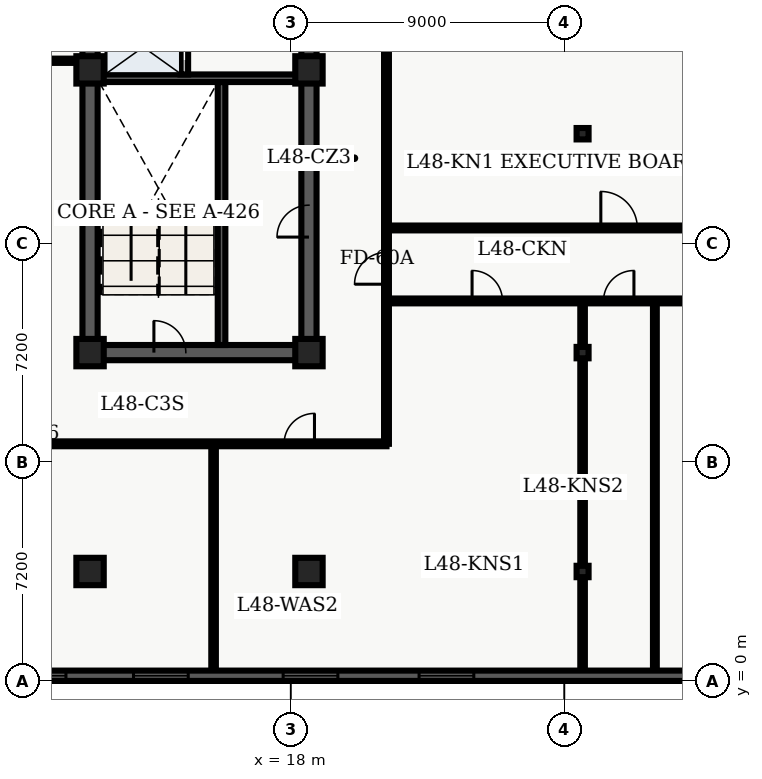
"""IFC4 building model, lengths in metres.
Left out: names, types, materials, properties, quantities, classifications, styles, units other than length and angle.
Written with IfcOpenShell. Run it as: python <this file> out.ifc"""

import sys

from ifc_helpers import new_model, entity, si_unit, converted_unit, direction, frame, origin_with_axes, origin_2d_with_axis, place, context, subcontext, project, spatial, polyline, rectangle, i_section, outline, extrude, element, fill, save


model = new_model("IFC4")
c1 = context("Model", 3, precision=1e-05, world=origin_with_axes(), true_north=direction((0.0, 1.0)))
c2 = subcontext(c1, "Body", "Model", "MODEL_VIEW")
j1 = project(units=[si_unit("LENGTHUNIT", "METRE"), converted_unit("PLANEANGLEUNIT", "DEGREE", entity("IfcPlaneAngleMeasure", 0.017), si_unit("PLANEANGLEUNIT", "RADIAN"), dimensions=[0, 0, 0, 0, 0, 0, 0])], contexts=[c1])
p1 = place(None, origin_with_axes())
s1 = spatial("IfcSite", under=j1, at=p1, CompositionType="ELEMENT")
p2 = place(p1, origin_with_axes())
s2 = spatial("IfcBuilding", under=s1, at=p2, CompositionType="ELEMENT")
p3 = place(p2, frame((0.0, 0.0, 196.5), z_axis=(0.0, 0.0, 1.0), x_axis=(1.0, 0.0, 0.0)))
s3 = spatial("IfcBuildingStorey", under=s2, at=p3, CompositionType="ELEMENT", Elevation=196.5)
p4 = place(p3, frame((11.4, 10.8, 0.0), z_axis=(0.0, 0.0, 1.0), x_axis=(0.0, 1.0, 0.0)))
e1 = element("IfcWall", 1, at=p4, inside=s3, PredefinedType="SHEAR", context=c2, shape_type="SweptSolid", body=[
    extrude(outline(polyline([(0.0, -0.25), (27.0, -0.25), (27.0, 0.25), (0.0, 0.25), (0.0, -0.25)])), origin_with_axes(), (0.0, 0.0, 1.0), 3.66),
])
p5 = place(p3, frame((11.4, 10.8, 0.0), z_axis=(0.0, 0.0, 1.0), x_axis=(1.0, 0.0, 0.0)))
e2 = element("IfcWall", 2, at=p5, inside=s3, PredefinedType="SHEAR", context=c2, shape_type="SweptSolid", body=[
    extrude(outline(polyline([(0.0, -0.25), (7.2, -0.25), (7.2, 0.25), (0.0, 0.25), (0.0, -0.25)])), origin_with_axes(), (0.0, 0.0, 1.0), 3.66),
])
p6 = place(p5, frame((2.625, 0.0, 0.0), z_axis=(0.0, 0.0, 1.0), x_axis=(1.0, 0.0, 0.0)))
e3 = element("IfcOpeningElement", 3, at=p6, cuts=e2, PredefinedType="OPENING", context=c2, shape_type="SweptSolid", body=[
    extrude(rectangle(XDim=1.05, YDim=0.52, at=origin_2d_with_axis()), origin_with_axes(), (0.0, 0.0, 1.0), 2.15),
])
p7 = place(p3, frame((18.6, 10.8, 0.0), z_axis=(0.0, 0.0, 1.0), x_axis=(0.0, 1.0, 0.0)))
e4 = element("IfcWall", 4, at=p7, inside=s3, PredefinedType="SHEAR", context=c2, shape_type="SweptSolid", body=[
    extrude(outline(polyline([(0.0, -0.25), (13.5, -0.25), (13.5, 0.25), (0.0, 0.25), (0.0, -0.25)])), origin_with_axes(), (0.0, 0.0, 1.0), 3.66),
])
p8 = place(p7, frame((11.125, 0.0, 0.0), z_axis=(0.0, 0.0, 1.0), x_axis=(1.0, 0.0, 0.0)))
e5 = element("IfcOpeningElement", 5, at=p8, cuts=e4, PredefinedType="OPENING", context=c2, shape_type="SweptSolid", body=[
    extrude(rectangle(XDim=1.05, YDim=0.52, at=origin_2d_with_axis()), origin_with_axes(), (0.0, 0.0, 1.0), 2.15),
])
p9 = place(p7, frame((4.325, 0.0, 0.0), z_axis=(0.0, 0.0, 1.0), x_axis=(1.0, 0.0, 0.0)))
e6 = element("IfcOpeningElement", 6, at=p9, cuts=e4, PredefinedType="OPENING", context=c2, shape_type="SweptSolid", body=[
    extrude(rectangle(XDim=1.05, YDim=0.52, at=origin_2d_with_axis()), origin_with_axes(), (0.0, 0.0, 1.0), 2.15),
])
p10 = place(p3, frame((15.725, 11.05, 0.0), z_axis=(0.0, 0.0, 1.0), x_axis=(0.0, 1.0, 0.0)))
e7 = element("IfcWall", 7, at=p10, inside=s3, PredefinedType="SHEAR", context=c2, shape_type="SweptSolid", body=[
    extrude(outline(polyline([(0.0, -0.125), (8.65, -0.125), (8.65, 0.125), (0.0, 0.125), (0.0, -0.125)])), origin_with_axes(), (0.0, 0.0, 1.0), 3.66),
])
p11 = place(p3, frame((11.65, 19.825, 0.0), z_axis=(0.0, 0.0, 1.0), x_axis=(1.0, 0.0, 0.0)))
e8 = element("IfcWall", 8, at=p11, inside=s3, PredefinedType="SHEAR", context=c2, shape_type="SweptSolid", body=[
    extrude(outline(polyline([(0.0, -0.125), (6.7, -0.125), (6.7, 0.125), (0.0, 0.125), (0.0, -0.125)])), origin_with_axes(), (0.0, 0.0, 1.0), 3.66),
])
p12 = place(p3, frame((14.5, 19.95, 0.0), z_axis=(0.0, 0.0, 1.0), x_axis=(0.0, 1.0, 0.0)))
e9 = element("IfcWall", 9, at=p12, inside=s3, PredefinedType="SOLIDWALL", context=c2, shape_type="SweptSolid", body=[
    extrude(outline(polyline([(0.0, -0.125), (6.25, -0.125), (6.25, 0.125), (0.0, 0.125), (0.0, -0.125)])), origin_with_axes(), (0.0, 0.0, 1.0), 2.7),
])
p13 = place(p12, frame((1.025, 0.0, 0.0), z_axis=(0.0, 0.0, 1.0), x_axis=(1.0, 0.0, 0.0)))
e10 = element("IfcOpeningElement", 10, at=p13, cuts=e9, PredefinedType="OPENING", context=c2, shape_type="SweptSolid", body=[
    extrude(rectangle(XDim=1.1, YDim=0.27, at=origin_2d_with_axis()), origin_with_axes(), (0.0, 0.0, 1.0), 2.15),
])
p14 = place(p12, frame((2.975, 0.0, 0.0), z_axis=(0.0, 0.0, 1.0), x_axis=(1.0, 0.0, 0.0)))
e11 = element("IfcOpeningElement", 11, at=p14, cuts=e9, PredefinedType="OPENING", context=c2, shape_type="SweptSolid", body=[
    extrude(rectangle(XDim=1.1, YDim=0.27, at=origin_2d_with_axis()), origin_with_axes(), (0.0, 0.0, 1.0), 2.15),
])
p15 = place(p12, frame((5.425, 0.0, 0.0), z_axis=(0.0, 0.0, 1.0), x_axis=(1.0, 0.0, 0.0)))
e12 = element("IfcOpeningElement", 12, at=p15, cuts=e9, PredefinedType="OPENING", context=c2, shape_type="SweptSolid", body=[
    extrude(rectangle(XDim=1.2, YDim=0.27, at=origin_2d_with_axis()), origin_with_axes(), (0.0, 0.0, 1.0), 2.15),
])
for number, where, z_axis, x_axis in (
    (13, (11.4, 3.6, 0.0), (0.0, 0.0, 1.0), (1.0, 0.0, 0.0)),
    (14, (11.4, 10.8, 0.0), (0.0, 0.0, 1.0), (1.0, 0.0, 0.0)),
    (15, (11.4, 20.1, 0.0), (0.0, 0.0, 1.0), (1.0, 0.0, 0.0)),
    (16, (18.6, 3.6, 0.0), (0.0, 0.0, 1.0), (1.0, 0.0, 0.0)),
    (17, (18.6, 10.8, 0.0), (0.0, 0.0, 1.0), (1.0, 0.0, 0.0)),
    (18, (18.6, 20.1, 0.0), (0.0, 0.0, 1.0), (1.0, 0.0, 0.0)),
):
    element("IfcColumn", number, at=place(p3, frame(where, z_axis=z_axis, x_axis=x_axis)), inside=s3, PredefinedType="COLUMN", context=c2, shape_type="SweptSolid", body=[
        extrude(rectangle(XDim=0.9, YDim=0.9, at=origin_2d_with_axis()), origin_with_axes(), (0.0, 0.0, 1.0), 3.9),
    ])
for number, where, z_axis, x_axis in (
    (19, (27.6, 3.6, 0.0), (0.0, 0.0, 1.0), (1.0, 0.0, 0.0)),
    (20, (27.6, 10.8, 0.0), (0.0, 0.0, 1.0), (1.0, 0.0, 0.0)),
    (21, (27.6, 18.0, 0.0), (0.0, 0.0, 1.0), (1.0, 0.0, 0.0)),
):
    element("IfcColumn", number, at=place(p3, frame(where, z_axis=z_axis, x_axis=x_axis)), inside=s3, PredefinedType="COLUMN", context=c2, shape_type="SweptSolid", body=[
        extrude(i_section(OverallWidth=0.394, OverallDepth=0.375, WebThickness=0.017, FlangeThickness=0.028, FilletRadius=0.02, at=origin_2d_with_axis()), origin_with_axes(), (0.0, 0.0, 1.0), 3.9),
    ])
p16 = place(p3, frame((9.52, 20.4, 0.0), z_axis=(0.0, 0.0, 1.0), x_axis=(1.0, 0.0, 0.0)))
e22 = element("IfcWall", 22, at=p16, inside=s3, PredefinedType="PARTITIONING", context=c2, shape_type="SweptSolid", body=[
    extrude(outline(polyline([(0.0, -0.07), (1.58, -0.07), (1.58, 0.07), (0.0, 0.07), (0.0, -0.07)])), origin_with_axes(), (0.0, 0.0, 1.0), 2.7),
])
p17 = place(p3, frame((2.6, 7.8, 0.0), z_axis=(0.0, 0.0, 1.0), x_axis=(1.0, 0.0, 0.0)))
e23 = element("IfcWall", 23, at=p17, inside=s3, PredefinedType="PARTITIONING", context=c2, shape_type="SweptSolid", body=[
    extrude(outline(polyline([(0.0, -0.08), (18.55, -0.08), (18.55, 0.08), (0.0, 0.08), (0.0, -0.08)])), origin_with_axes(), (0.0, 0.0, 1.0), 2.7),
])
p18 = place(p17, frame((6.426, 0.0, 0.0), z_axis=(0.0, 0.0, 1.0), x_axis=(1.0, 0.0, 0.0)))
e24 = element("IfcOpeningElement", 24, at=p18, cuts=e23, PredefinedType="OPENING", context=c2, shape_type="SweptSolid", body=[
    extrude(rectangle(XDim=1.2, YDim=0.18, at=origin_2d_with_axis()), origin_with_axes(), (0.0, 0.0, 1.0), 2.2),
])
p19 = place(p17, frame((15.681, 0.0, 0.0), z_axis=(0.0, 0.0, 1.0), x_axis=(1.0, 0.0, 0.0)))
e25 = element("IfcOpeningElement", 25, at=p19, cuts=e23, PredefinedType="OPENING", context=c2, shape_type="SweptSolid", body=[
    extrude(rectangle(XDim=1.0, YDim=0.18, at=origin_2d_with_axis()), origin_with_axes(), (0.0, 0.0, 1.0), 2.15),
])
p20 = place(p3, frame((21.15, 7.8, 0.0), z_axis=(0.0, 0.0, 1.0), x_axis=(0.0, 1.0, 0.0)))
e26 = element("IfcWall", 26, at=p20, inside=s3, PredefinedType="PARTITIONING", context=c2, shape_type="SweptSolid", body=[
    extrude(outline(polyline([(0.0, -0.08), (32.7, -0.08), (32.7, 0.08), (0.0, 0.08), (0.0, -0.08)])), origin_with_axes(), (0.0, 0.0, 1.0), 2.7),
])
p21 = place(p20, frame((16.235, 0.0, 0.0), z_axis=(0.0, 0.0, 1.0), x_axis=(1.0, 0.0, 0.0)))
e27 = element("IfcOpeningElement", 27, at=p21, cuts=e26, PredefinedType="OPENING", context=c2, shape_type="SweptSolid", body=[
    extrude(rectangle(XDim=1.0, YDim=0.18, at=origin_2d_with_axis()), origin_with_axes(), (0.0, 0.0, 1.0), 2.15),
])
p22 = place(p20, frame((20.023, 0.0, 0.0), z_axis=(0.0, 0.0, 1.0), x_axis=(1.0, 0.0, 0.0)))
e28 = element("IfcOpeningElement", 28, at=p22, cuts=e26, PredefinedType="OPENING", context=c2, shape_type="SweptSolid", body=[
    extrude(rectangle(XDim=1.0, YDim=0.18, at=origin_2d_with_axis()), origin_with_axes(), (0.0, 0.0, 1.0), 2.15),
])
p23 = place(p20, frame((23.135, 0.0, 0.0), z_axis=(0.0, 0.0, 1.0), x_axis=(1.0, 0.0, 0.0)))
e29 = element("IfcOpeningElement", 29, at=p23, cuts=e26, PredefinedType="OPENING", context=c2, shape_type="SweptSolid", body=[
    extrude(rectangle(XDim=1.0, YDim=0.18, at=origin_2d_with_axis()), origin_with_axes(), (0.0, 0.0, 1.0), 2.15),
])
p24 = place(p20, frame((26.594, 0.0, 0.0), z_axis=(0.0, 0.0, 1.0), x_axis=(1.0, 0.0, 0.0)))
e30 = element("IfcOpeningElement", 30, at=p24, cuts=e26, PredefinedType="OPENING", context=c2, shape_type="SweptSolid", body=[
    extrude(rectangle(XDim=1.0, YDim=0.18, at=origin_2d_with_axis()), origin_with_axes(), (0.0, 0.0, 1.0), 2.15),
])
p25 = place(p20, frame((30.498, 0.0, 0.0), z_axis=(0.0, 0.0, 1.0), x_axis=(1.0, 0.0, 0.0)))
e31 = element("IfcOpeningElement", 31, at=p25, cuts=e26, PredefinedType="OPENING", context=c2, shape_type="SweptSolid", body=[
    extrude(rectangle(XDim=1.0, YDim=0.18, at=origin_2d_with_axis()), origin_with_axes(), (0.0, 0.0, 1.0), 2.15),
])
p26 = place(p20, frame((5.775, 0.0, 0.0), z_axis=(0.0, 0.0, 1.0), x_axis=(1.0, 0.0, 0.0)))
e32 = element("IfcOpeningElement", 32, at=p26, cuts=e26, PredefinedType="OPENING", context=c2, shape_type="SweptSolid", body=[
    extrude(rectangle(XDim=1.05, YDim=0.18, at=origin_2d_with_axis()), origin_with_axes(), (0.0, 0.0, 1.0), 2.15),
])
p27 = place(p3, frame((15.463, 0.335, 0.0), z_axis=(0.0, 0.0, 1.0), x_axis=(0.0, 1.0, 0.0)))
e33 = element("IfcWall", 33, at=p27, inside=s3, PredefinedType="PARTITIONING", context=c2, shape_type="SweptSolid", body=[
    extrude(outline(polyline([(0.0, -0.075), (7.365, -0.075), (7.365, 0.075), (0.0, 0.075), (0.0, -0.075)])), origin_with_axes(), (0.0, 0.0, 1.0), 2.7),
])
p28 = place(p3, frame((21.15, 12.5, 0.0), z_axis=(0.0, 0.0, 1.0), x_axis=(1.0, 0.0, 0.0)))
e34 = element("IfcWall", 34, at=p28, inside=s3, PredefinedType="PARTITIONING", context=c2, shape_type="SweptSolid", body=[
    extrude(outline(polyline([(0.0, -0.08), (15.2, -0.08), (15.2, 0.08), (0.0, 0.08), (0.0, -0.08)])), origin_with_axes(), (0.0, 0.0, 1.0), 2.7),
])
p29 = place(p28, frame((3.315, 0.0, 0.0), z_axis=(0.0, 0.0, 1.0), x_axis=(1.0, 0.0, 0.0)))
e35 = element("IfcOpeningElement", 35, at=p29, cuts=e34, PredefinedType="OPENING", context=c2, shape_type="SweptSolid", body=[
    extrude(rectangle(XDim=1.0, YDim=0.18, at=origin_2d_with_axis()), origin_with_axes(), (0.0, 0.0, 1.0), 2.15),
])
p30 = place(p28, frame((7.639, 0.0, 0.0), z_axis=(0.0, 0.0, 1.0), x_axis=(1.0, 0.0, 0.0)))
e36 = element("IfcOpeningElement", 36, at=p30, cuts=e34, PredefinedType="OPENING", context=c2, shape_type="SweptSolid", body=[
    extrude(rectangle(XDim=1.0, YDim=0.18, at=origin_2d_with_axis()), origin_with_axes(), (0.0, 0.0, 1.0), 2.15),
])
p31 = place(p28, frame((10.313, 0.0, 0.0), z_axis=(0.0, 0.0, 1.0), x_axis=(1.0, 0.0, 0.0)))
e37 = element("IfcOpeningElement", 37, at=p31, cuts=e34, PredefinedType="OPENING", context=c2, shape_type="SweptSolid", body=[
    extrude(rectangle(XDim=1.0, YDim=0.18, at=origin_2d_with_axis()), origin_with_axes(), (0.0, 0.0, 1.0), 2.15),
])
p32 = place(p28, frame((13.179, 0.0, 0.0), z_axis=(0.0, 0.0, 1.0), x_axis=(1.0, 0.0, 0.0)))
e38 = element("IfcOpeningElement", 38, at=p32, cuts=e34, PredefinedType="OPENING", context=c2, shape_type="SweptSolid", body=[
    extrude(rectangle(XDim=1.0, YDim=0.18, at=origin_2d_with_axis()), origin_with_axes(), (0.0, 0.0, 1.0), 2.15),
])
p33 = place(p3, frame((21.15, 14.9, 0.0), z_axis=(0.0, 0.0, 1.0), x_axis=(1.0, 0.0, 0.0)))
e39 = element("IfcWall", 39, at=p33, inside=s3, PredefinedType="PARTITIONING", context=c2, shape_type="SweptSolid", body=[
    extrude(outline(polyline([(0.0, -0.08), (15.2, -0.08), (15.2, 0.08), (0.0, 0.08), (0.0, -0.08)])), origin_with_axes(), (0.0, 0.0, 1.0), 2.7),
])
p34 = place(p33, frame((7.65, 0.0, 0.0), z_axis=(0.0, 0.0, 1.0), x_axis=(1.0, 0.0, 0.0)))
e40 = element("IfcOpeningElement", 40, at=p34, cuts=e39, PredefinedType="OPENING", context=c2, shape_type="SweptSolid", body=[
    extrude(rectangle(XDim=1.2, YDim=0.18, at=origin_2d_with_axis()), origin_with_axes(), (0.0, 0.0, 1.0), 2.2),
])
p35 = place(p3, frame((27.6, 0.335, 0.0), z_axis=(0.0, 0.0, 1.0), x_axis=(0.0, 1.0, 0.0)))
e41 = element("IfcWall", 41, at=p35, inside=s3, PredefinedType="PARTITIONING", context=c2, shape_type="SweptSolid", body=[
    extrude(outline(polyline([(0.0, -0.075), (12.045, -0.075), (12.045, 0.075), (0.0, 0.075), (0.0, -0.075)])), origin_with_axes(), (0.0, 0.0, 1.0), 2.7),
])
p36 = place(p3, frame((29.978, 0.335, 0.0), z_axis=(0.0, 0.0, 1.0), x_axis=(0.0, 1.0, 0.0)))
e42 = element("IfcWall", 42, at=p36, inside=s3, PredefinedType="PARTITIONING", context=c2, shape_type="SweptSolid", body=[
    extrude(outline(polyline([(0.0, -0.062), (12.045, -0.062), (12.045, 0.062), (0.0, 0.062), (0.0, -0.062)])), origin_with_axes(), (0.0, 0.0, 1.0), 2.7),
])
p37 = place(p3, frame((57.26, 0.17, 0.0), z_axis=(0.0, 0.0, 1.0), x_axis=(-1.0, 0.0, 0.0)))
e43 = element("IfcWall", 43, at=p37, inside=s3, PredefinedType="SOLIDWALL", context=c2, shape_type="SweptSolid", body=[
    extrude(outline(polyline([(0.0, -0.17), (54.86, -0.17), (54.86, 0.17), (0.0, 0.17), (0.0, -0.17)])), origin_with_axes(), (0.0, 0.0, 1.0), 3.66),
])
p38 = place(p37, frame((2.836, 0.0, 0.45), z_axis=(0.0, 0.0, 1.0), x_axis=(1.0, 0.0, 0.0)))
e44 = element("IfcOpeningElement", 44, at=p38, cuts=e43, PredefinedType="OPENING", context=c2, shape_type="SweptSolid", body=[
    extrude(rectangle(XDim=1.8, YDim=0.36, at=origin_2d_with_axis()), origin_with_axes(), (0.0, 0.0, 1.0), 2.1),
])
p39 = place(p37, frame((7.307, 0.0, 0.45), z_axis=(0.0, 0.0, 1.0), x_axis=(1.0, 0.0, 0.0)))
e45 = element("IfcOpeningElement", 45, at=p39, cuts=e43, PredefinedType="OPENING", context=c2, shape_type="SweptSolid", body=[
    extrude(rectangle(XDim=1.8, YDim=0.36, at=origin_2d_with_axis()), origin_with_axes(), (0.0, 0.0, 1.0), 2.1),
])
p40 = place(p37, frame((11.779, 0.0, 0.45), z_axis=(0.0, 0.0, 1.0), x_axis=(1.0, 0.0, 0.0)))
e46 = element("IfcOpeningElement", 46, at=p40, cuts=e43, PredefinedType="OPENING", context=c2, shape_type="SweptSolid", body=[
    extrude(rectangle(XDim=1.8, YDim=0.36, at=origin_2d_with_axis()), origin_with_axes(), (0.0, 0.0, 1.0), 2.1),
])
p41 = place(p37, frame((16.251, 0.0, 0.45), z_axis=(0.0, 0.0, 1.0), x_axis=(1.0, 0.0, 0.0)))
e47 = element("IfcOpeningElement", 47, at=p41, cuts=e43, PredefinedType="OPENING", context=c2, shape_type="SweptSolid", body=[
    extrude(rectangle(XDim=1.8, YDim=0.36, at=origin_2d_with_axis()), origin_with_axes(), (0.0, 0.0, 1.0), 2.1),
])
p42 = place(p37, frame((20.723, 0.0, 0.45), z_axis=(0.0, 0.0, 1.0), x_axis=(1.0, 0.0, 0.0)))
e48 = element("IfcOpeningElement", 48, at=p42, cuts=e43, PredefinedType="OPENING", context=c2, shape_type="SweptSolid", body=[
    extrude(rectangle(XDim=1.8, YDim=0.36, at=origin_2d_with_axis()), origin_with_axes(), (0.0, 0.0, 1.0), 2.1),
])
p43 = place(p37, frame((34.138, 0.0, 0.45), z_axis=(0.0, 0.0, 1.0), x_axis=(1.0, 0.0, 0.0)))
e49 = element("IfcOpeningElement", 49, at=p43, cuts=e43, PredefinedType="OPENING", context=c2, shape_type="SweptSolid", body=[
    extrude(rectangle(XDim=1.8, YDim=0.36, at=origin_2d_with_axis()), origin_with_axes(), (0.0, 0.0, 1.0), 2.1),
])
p44 = place(p37, frame((38.609, 0.0, 0.45), z_axis=(0.0, 0.0, 1.0), x_axis=(1.0, 0.0, 0.0)))
e50 = element("IfcOpeningElement", 50, at=p44, cuts=e43, PredefinedType="OPENING", context=c2, shape_type="SweptSolid", body=[
    extrude(rectangle(XDim=1.8, YDim=0.36, at=origin_2d_with_axis()), origin_with_axes(), (0.0, 0.0, 1.0), 2.1),
])
p45 = place(p37, frame((43.531, 0.0, 0.45), z_axis=(0.0, 0.0, 1.0), x_axis=(1.0, 0.0, 0.0)))
e51 = element("IfcOpeningElement", 51, at=p45, cuts=e43, PredefinedType="OPENING", context=c2, shape_type="SweptSolid", body=[
    extrude(rectangle(XDim=1.8, YDim=0.36, at=origin_2d_with_axis()), origin_with_axes(), (0.0, 0.0, 1.0), 2.1),
])
p46 = place(p37, frame((47.553, 0.0, 0.45), z_axis=(0.0, 0.0, 1.0), x_axis=(1.0, 0.0, 0.0)))
e52 = element("IfcOpeningElement", 52, at=p46, cuts=e43, PredefinedType="OPENING", context=c2, shape_type="SweptSolid", body=[
    extrude(rectangle(XDim=1.8, YDim=0.36, at=origin_2d_with_axis()), origin_with_axes(), (0.0, 0.0, 1.0), 2.1),
])
p47 = place(p37, frame((52.024, 0.0, 0.45), z_axis=(0.0, 0.0, 1.0), x_axis=(1.0, 0.0, 0.0)))
e53 = element("IfcOpeningElement", 53, at=p47, cuts=e43, PredefinedType="OPENING", context=c2, shape_type="SweptSolid", body=[
    extrude(rectangle(XDim=1.8, YDim=0.36, at=origin_2d_with_axis()), origin_with_axes(), (0.0, 0.0, 1.0), 2.1),
])
p48 = place(p12, frame((1.025, 0.0, 0.0), z_axis=(0.0, 0.0, 1.0), x_axis=(1.0, 0.0, 0.0)))
e54 = element("IfcDoor", 54, at=p48, inside=s3, OperationType="SLIDING_TO_LEFT", PredefinedType="DOOR", context=c2, shape_type="SweptSolid", body=[
    extrude(rectangle(XDim=1.1, YDim=0.09, at=origin_2d_with_axis()), origin_with_axes(), (0.0, 0.0, 1.0), 2.15),
])
fill(e10, e54)
p49 = place(p5, frame((2.625, 0.0, 0.0), z_axis=(0.0, 0.0, 1.0), x_axis=(1.0, 0.0, 0.0)))
e55 = element("IfcDoor", 55, at=p49, inside=s3, OperationType="SINGLE_SWING_LEFT", PredefinedType="DOOR", context=c2, shape_type="SweptSolid", body=[
    extrude(rectangle(XDim=1.05, YDim=0.09, at=origin_2d_with_axis()), origin_with_axes(), (0.0, 0.0, 1.0), 2.15),
])
fill(e3, e55)
p50 = place(p7, frame((4.325, 0.0, 0.0), z_axis=(0.0, 0.0, 1.0), x_axis=(1.0, 0.0, 0.0)))
e56 = element("IfcDoor", 56, at=p50, inside=s3, OperationType="SINGLE_SWING_LEFT", PredefinedType="DOOR", context=c2, shape_type="SweptSolid", body=[
    extrude(rectangle(XDim=1.05, YDim=0.09, at=origin_2d_with_axis()), origin_with_axes(), (0.0, 0.0, 1.0), 2.15),
])
fill(e6, e56)
p51 = place(p17, frame((15.681, 0.0, 0.0), z_axis=(0.0, 0.0, 1.0), x_axis=(1.0, 0.0, 0.0)))
e57 = element("IfcDoor", 57, at=p51, inside=s3, OperationType="SINGLE_SWING_RIGHT", PredefinedType="DOOR", context=c2, shape_type="SweptSolid", body=[
    extrude(rectangle(XDim=1.0, YDim=0.09, at=origin_2d_with_axis()), origin_with_axes(), (0.0, 0.0, 1.0), 2.15),
])
fill(e25, e57)
p52 = place(p20, frame((5.775, 0.0, 0.0), z_axis=(0.0, 0.0, 1.0), x_axis=(1.0, 0.0, 0.0)))
e58 = element("IfcDoor", 58, at=p52, inside=s3, OperationType="SINGLE_SWING_LEFT", PredefinedType="DOOR", context=c2, shape_type="SweptSolid", body=[
    extrude(rectangle(XDim=1.05, YDim=0.09, at=origin_2d_with_axis()), origin_with_axes(), (0.0, 0.0, 1.0), 2.15),
])
fill(e32, e58)
p53 = place(p28, frame((3.315, 0.0, 0.0), z_axis=(0.0, 0.0, 1.0), x_axis=(1.0, 0.0, 0.0)))
e59 = element("IfcDoor", 59, at=p53, inside=s3, OperationType="SINGLE_SWING_LEFT", PredefinedType="DOOR", context=c2, shape_type="SweptSolid", body=[
    extrude(rectangle(XDim=1.0, YDim=0.09, at=origin_2d_with_axis()), origin_with_axes(), (0.0, 0.0, 1.0), 2.15),
])
fill(e35, e59)
p54 = place(p28, frame((7.639, 0.0, 0.0), z_axis=(0.0, 0.0, 1.0), x_axis=(1.0, 0.0, 0.0)))
e60 = element("IfcDoor", 60, at=p54, inside=s3, OperationType="SINGLE_SWING_RIGHT", PredefinedType="DOOR", context=c2, shape_type="SweptSolid", body=[
    extrude(rectangle(XDim=1.0, YDim=0.09, at=origin_2d_with_axis()), origin_with_axes(), (0.0, 0.0, 1.0), 2.15),
])
fill(e36, e60)
p55 = place(p33, frame((7.65, 0.0, 0.0), z_axis=(0.0, 0.0, 1.0), x_axis=(1.0, 0.0, 0.0)))
e61 = element("IfcDoor", 61, at=p55, inside=s3, OperationType="SINGLE_SWING_LEFT", PredefinedType="DOOR", context=c2, shape_type="SweptSolid", body=[
    extrude(rectangle(XDim=1.2, YDim=0.09, at=origin_2d_with_axis()), origin_with_axes(), (0.0, 0.0, 1.0), 2.2),
])
fill(e40, e61)
p56 = place(p37, frame((34.138, 0.0, 0.45), z_axis=(0.0, 0.0, 1.0), x_axis=(1.0, 0.0, 0.0)))
e62 = element("IfcWindow", 62, at=p56, inside=s3, PredefinedType="WINDOW", context=c2, shape_type="SweptSolid", body=[
    extrude(rectangle(XDim=1.8, YDim=0.09, at=origin_2d_with_axis()), origin_with_axes(), (0.0, 0.0, 1.0), 2.1),
])
fill(e49, e62)
p57 = place(p37, frame((38.609, 0.0, 0.45), z_axis=(0.0, 0.0, 1.0), x_axis=(1.0, 0.0, 0.0)))
e63 = element("IfcWindow", 63, at=p57, inside=s3, PredefinedType="WINDOW", context=c2, shape_type="SweptSolid", body=[
    extrude(rectangle(XDim=1.8, YDim=0.09, at=origin_2d_with_axis()), origin_with_axes(), (0.0, 0.0, 1.0), 2.1),
])
fill(e50, e63)
p58 = place(p37, frame((43.531, 0.0, 0.45), z_axis=(0.0, 0.0, 1.0), x_axis=(1.0, 0.0, 0.0)))
e64 = element("IfcWindow", 64, at=p58, inside=s3, PredefinedType="WINDOW", context=c2, shape_type="SweptSolid", body=[
    extrude(rectangle(XDim=1.8, YDim=0.09, at=origin_2d_with_axis()), origin_with_axes(), (0.0, 0.0, 1.0), 2.1),
])
fill(e51, e64)
p59 = place(p37, frame((47.553, 0.0, 0.45), z_axis=(0.0, 0.0, 1.0), x_axis=(1.0, 0.0, 0.0)))
e65 = element("IfcWindow", 65, at=p59, inside=s3, PredefinedType="WINDOW", context=c2, shape_type="SweptSolid", body=[
    extrude(rectangle(XDim=1.8, YDim=0.09, at=origin_2d_with_axis()), origin_with_axes(), (0.0, 0.0, 1.0), 2.1),
])
fill(e52, e65)
save(model, sys.argv[1])
